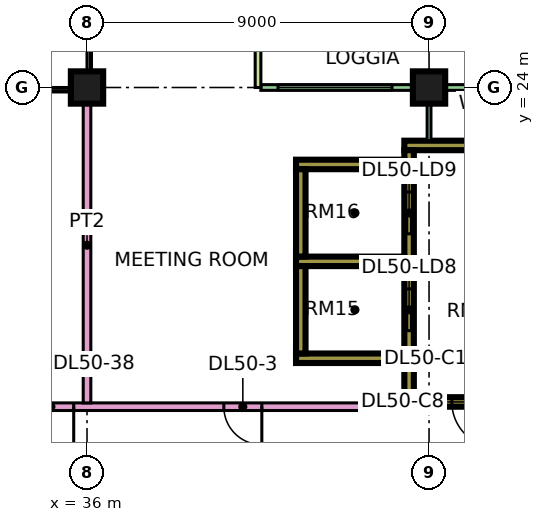
"""IFC4 building model, lengths in metres.
Left out: names, types, materials, properties, quantities, classifications, styles, units other than length and angle.
Written with IfcOpenShell. Run it as: python <this file> out.ifc"""

import sys

from ifc_helpers import new_model, si_unit, direction, frame, frame_2d, origin, origin_2d, place, context, subcontext, project, spatial, rectangle, extrude, element, fill, save


model = new_model("IFC4")
c1 = context("Model", 3, precision=1e-05, world=origin(), true_north=direction((0.0, 1.0)))
c2 = subcontext(c1, "Body", "Model", "MODEL_VIEW")
j1 = project(units=[si_unit("LENGTHUNIT", "METRE"), si_unit("PLANEANGLEUNIT", "RADIAN")], contexts=[c1])
p1 = place(None, origin())
s1 = spatial("IfcSite", under=j1, at=p1, CompositionType="ELEMENT")
p2 = place(p1, origin())
s2 = spatial("IfcBuilding", under=s1, at=p2, CompositionType="ELEMENT")
p3 = place(p2, frame((0.0, 0.0, 215.4)))
s3 = spatial("IfcBuildingStorey", under=s2, at=p3, CompositionType="ELEMENT", Elevation=215.4)
for number, where, z_axis, x_axis in (
    (1, (36.0, 24.0, 0.0), (0.0, 0.0, 1.0), (1.0, 0.0, 0.0)),
    (2, (45.0, 24.0, 0.0), (0.0, 0.0, 1.0), (1.0, 0.0, 0.0)),
):
    element("IfcColumn", number, at=place(p3, frame(where, z_axis=z_axis, x_axis=x_axis)), inside=s3, PredefinedType="COLUMN", context=c2, shape_type="SweptSolid", body=[
        extrude(rectangle(XDim=0.85, YDim=0.85, at=origin_2d()), origin(), (0.0, 0.0, 1.0), 3.75),
    ])
p4 = place(p3, frame((44.35, 15.725, 0.0), z_axis=(0.0, 0.0, 1.0), x_axis=(1.0, 0.0, 0.0)))
e3 = element("IfcWall", 3, at=p4, inside=s3, PredefinedType="SHEAR", context=c2, shape_type="SweptSolid", body=[
    extrude(rectangle(XDim=3.425, YDim=0.25, at=frame_2d((1.712, 0.0))), origin(), (0.0, 0.0, 1.0), 3.75),
])
p5 = place(p4, frame((1.25, 0.0, 0.0)))
e4 = element("IfcOpeningElement", 4, at=p5, cuts=e3, PredefinedType="OPENING", context=c2, shape_type="SweptSolid", body=[
    extrude(rectangle(XDim=1.2, YDim=2.2, at=frame_2d((0.6, 1.1))), frame((0.0, 0.135, 0.0), z_axis=(0.0, -1.0, 0.0), x_axis=(1.0, 0.0, 0.0)), (0.0, 0.0, 1.0), 0.27),
])
p6 = place(p3, frame((44.35, 22.475, 0.0), z_axis=(0.0, 0.0, 1.0), x_axis=(1.0, 0.0, 0.0)))
e5 = element("IfcWall", 5, at=p6, inside=s3, PredefinedType="SHEAR", context=c2, shape_type="SweptSolid", body=[
    extrude(rectangle(XDim=3.425, YDim=0.25, at=frame_2d((1.712, 0.0))), origin(), (0.0, 0.0, 1.0), 3.75),
])
p7 = place(p3, frame((44.475, 15.85, 0.0), z_axis=(0.0, 0.0, 1.0), x_axis=(0.0, 1.0, 0.0)))
e6 = element("IfcWall", 6, at=p7, inside=s3, PredefinedType="SHEAR", context=c2, shape_type="SweptSolid", body=[
    extrude(rectangle(XDim=6.5, YDim=0.25, at=frame_2d((3.25, 0.0))), origin(), (0.0, 0.0, 1.0), 3.75),
])
p8 = place(p7, frame((1.75, 0.0, 0.0)))
e7 = element("IfcOpeningElement", 7, at=p8, cuts=e6, PredefinedType="OPENING", context=c2, shape_type="SweptSolid", body=[
    extrude(rectangle(XDim=1.1, YDim=2.2, at=frame_2d((0.55, 1.1))), frame((0.0, 0.135, 0.0), z_axis=(0.0, -1.0, 0.0), x_axis=(1.0, 0.0, 0.0)), (0.0, 0.0, 1.0), 0.27),
])
p9 = place(p7, frame((4.3, 0.0, 0.0)))
e8 = element("IfcOpeningElement", 8, at=p9, cuts=e6, PredefinedType="OPENING", context=c2, shape_type="SweptSolid", body=[
    extrude(rectangle(XDim=1.1, YDim=2.2, at=frame_2d((0.55, 1.1))), frame((0.0, 0.135, 0.0), z_axis=(0.0, -1.0, 0.0), x_axis=(1.0, 0.0, 0.0)), (0.0, 0.0, 1.0), 0.27),
])
for number, where, z_axis, x_axis in (
    (9, (41.5, 16.875, 0.0), (0.0, 0.0, 1.0), (1.0, 0.0, 0.0)),
    (10, (41.5, 19.425, 0.0), (0.0, 0.0, 1.0), (1.0, 0.0, 0.0)),
    (11, (41.5, 21.975, 0.0), (0.0, 0.0, 1.0), (1.0, 0.0, 0.0)),
):
    element("IfcWall", number, at=place(p3, frame(where, z_axis=z_axis, x_axis=x_axis)), inside=s3, PredefinedType="SHEAR", context=c2, shape_type="SweptSolid", body=[
        extrude(rectangle(XDim=2.85, YDim=0.25, at=frame_2d((1.425, 0.0))), origin(), (0.0, 0.0, 1.0), 3.75),
    ])
for number, where, z_axis, x_axis in (
    (12, (41.625, 17.0, 0.0), (0.0, 0.0, 1.0), (0.0, 1.0, 0.0)),
    (13, (41.625, 19.55, 0.0), (0.0, 0.0, 1.0), (0.0, 1.0, 0.0)),
):
    element("IfcWall", number, at=place(p3, frame(where, z_axis=z_axis, x_axis=x_axis)), inside=s3, PredefinedType="SHEAR", context=c2, shape_type="SweptSolid", body=[
        extrude(rectangle(XDim=2.3, YDim=0.25, at=frame_2d((1.15, 0.0))), origin(), (0.0, 0.0, 1.0), 3.75),
    ])
p10 = place(p3, frame((47.925, 24.0, 0.0), z_axis=(0.0, 0.0, 1.0), x_axis=(-1.0, 0.0, 0.0)))
e14 = element("IfcWall", 14, at=p10, inside=s3, PredefinedType="SOLIDWALL", context=c2, shape_type="SweptSolid", body=[
    extrude(rectangle(XDim=7.35, YDim=0.15, at=frame_2d((3.675, 0.0))), origin(), (0.0, 0.0, 1.0), 3.35),
])
p11 = place(p10, frame((0.6, 0.0, 0.45)))
e15 = element("IfcOpeningElement", 15, at=p11, cuts=e14, PredefinedType="OPENING", context=c2, shape_type="SweptSolid", body=[
    extrude(rectangle(XDim=1.2, YDim=2.4, at=frame_2d((0.6, 1.2))), frame((0.0, 0.085, 0.0), z_axis=(0.0, -1.0, 0.0), x_axis=(1.0, 0.0, 0.0)), (0.0, 0.0, 1.0), 0.17),
])
p12 = place(p10, frame((3.9, 0.0, 0.45)))
e16 = element("IfcOpeningElement", 16, at=p12, cuts=e14, PredefinedType="OPENING", context=c2, shape_type="SweptSolid", body=[
    extrude(rectangle(XDim=3.0, YDim=2.4, at=frame_2d((1.5, 1.2))), frame((0.0, 0.085, 0.0), z_axis=(0.0, -1.0, 0.0), x_axis=(1.0, 0.0, 0.0)), (0.0, 0.0, 1.0), 0.17),
])
p13 = place(p3, frame((40.5, 25.5, 0.0), z_axis=(0.0, 0.0, 1.0), x_axis=(0.0, -1.0, 0.0)))
e17 = element("IfcWall", 17, at=p13, inside=s3, PredefinedType="SOLIDWALL", context=c2, shape_type="SweptSolid", body=[
    extrude(rectangle(XDim=1.5, YDim=0.15, at=frame_2d((0.75, 0.0))), origin(), (0.0, 0.0, 1.0), 3.35),
])
p14 = place(p3, frame((34.0, 15.6, 0.0), z_axis=(0.0, 0.0, 1.0), x_axis=(1.0, 0.0, 0.0)))
e18 = element("IfcWall", 18, at=p14, inside=s3, PredefinedType="PARTITIONING", context=c2, shape_type="SweptSolid", body=[
    extrude(rectangle(XDim=10.35, YDim=0.2, at=frame_2d((5.175, 0.0))), origin(), (0.0, 0.0, 1.0), 3.35),
])
p15 = place(p14, frame((5.6, 0.0, 0.0)))
e19 = element("IfcOpeningElement", 19, at=p15, cuts=e18, PredefinedType="OPENING", context=c2, shape_type="SweptSolid", body=[
    extrude(rectangle(XDim=1.0, YDim=2.1, at=frame_2d((0.5, 1.05))), frame((0.0, 0.11, 0.0), z_axis=(0.0, -1.0, 0.0), x_axis=(1.0, 0.0, 0.0)), (0.0, 0.0, 1.0), 0.22),
])
p16 = place(p14, frame((0.45, 0.0, 0.0)))
e20 = element("IfcOpeningElement", 20, at=p16, cuts=e18, PredefinedType="OPENING", context=c2, shape_type="SweptSolid", body=[
    extrude(rectangle(XDim=1.2, YDim=2.1, at=frame_2d((0.6, 1.05))), frame((0.0, 0.11, 0.0), z_axis=(0.0, -1.0, 0.0), x_axis=(1.0, 0.0, 0.0)), (0.0, 0.0, 1.0), 0.22),
])
p17 = place(p3, frame((36.0, 15.7, 0.0), z_axis=(0.0, 0.0, 1.0), x_axis=(0.0, 1.0, 0.0)))
e21 = element("IfcWall", 21, at=p17, inside=s3, PredefinedType="PARTITIONING", context=c2, shape_type="SweptSolid", body=[
    extrude(rectangle(XDim=8.3, YDim=0.2, at=frame_2d((4.15, 0.0))), origin(), (0.0, 0.0, 1.0), 3.35),
])
p18 = place(p3, frame((45.0, 22.6, 0.0), z_axis=(0.0, 0.0, 1.0), x_axis=(0.0, 1.0, 0.0)))
e22 = element("IfcWall", 22, at=p18, inside=s3, PredefinedType="PARTITIONING", context=c2, shape_type="SweptSolid", body=[
    extrude(rectangle(XDim=1.326, YDim=0.1, at=frame_2d((0.663, 0.0))), origin(), (0.0, 0.0, 1.0), 3.35),
])
p19 = place(p12, origin())
e23 = element("IfcWindow", 23, at=p19, inside=s3, PartitioningType="SINGLE_PANEL", PredefinedType="WINDOW", context=c2, shape_type="SweptSolid", body=[
    extrude(rectangle(XDim=3.0, YDim=2.4, at=frame_2d((1.5, 1.2))), frame((0.0, 0.03, 0.0), z_axis=(0.0, -1.0, 0.0), x_axis=(1.0, 0.0, 0.0)), (0.0, 0.0, 1.0), 0.06),
])
fill(e16, e23)
p20 = place(p5, origin())
e24 = element("IfcDoor", 24, at=p20, inside=s3, OperationType="SINGLE_SWING_RIGHT", PredefinedType="DOOR", context=c2, shape_type="SweptSolid", body=[
    extrude(rectangle(XDim=1.2, YDim=2.2, at=frame_2d((0.6, 1.1))), frame((0.0, 0.025, 0.0), z_axis=(0.0, -1.0, 0.0), x_axis=(1.0, 0.0, 0.0)), (0.0, 0.0, 1.0), 0.05),
])
fill(e4, e24)
p21 = place(p8, origin())
e25 = element("IfcDoor", 25, at=p21, inside=s3, OperationType="DOUBLE_DOOR_SLIDING", PredefinedType="DOOR", context=c2, shape_type="SweptSolid", body=[
    extrude(rectangle(XDim=1.1, YDim=2.2, at=frame_2d((0.55, 1.1))), frame((0.0, 0.025, 0.0), z_axis=(0.0, -1.0, 0.0), x_axis=(1.0, 0.0, 0.0)), (0.0, 0.0, 1.0), 0.05),
])
fill(e7, e25)
p22 = place(p9, origin())
e26 = element("IfcDoor", 26, at=p22, inside=s3, OperationType="DOUBLE_DOOR_SLIDING", PredefinedType="DOOR", context=c2, shape_type="SweptSolid", body=[
    extrude(rectangle(XDim=1.1, YDim=2.2, at=frame_2d((0.55, 1.1))), frame((0.0, 0.025, 0.0), z_axis=(0.0, -1.0, 0.0), x_axis=(1.0, 0.0, 0.0)), (0.0, 0.0, 1.0), 0.05),
])
fill(e8, e26)
p23 = place(p15, origin())
e27 = element("IfcDoor", 27, at=p23, inside=s3, OperationType="SINGLE_SWING_RIGHT", PredefinedType="DOOR", context=c2, shape_type="SweptSolid", body=[
    extrude(rectangle(XDim=1.0, YDim=2.1, at=frame_2d((0.5, 1.05))), frame((0.0, 0.025, 0.0), z_axis=(0.0, -1.0, 0.0), x_axis=(1.0, 0.0, 0.0)), (0.0, 0.0, 1.0), 0.05),
])
fill(e19, e27)
p24 = place(p16, origin())
e28 = element("IfcDoor", 28, at=p24, inside=s3, OperationType="SINGLE_SWING_RIGHT", PredefinedType="DOOR", context=c2, shape_type="SweptSolid", body=[
    extrude(rectangle(XDim=1.2, YDim=2.1, at=frame_2d((0.6, 1.05))), frame((0.0, 0.025, 0.0), z_axis=(0.0, -1.0, 0.0), x_axis=(1.0, 0.0, 0.0)), (0.0, 0.0, 1.0), 0.05),
])
fill(e20, e28)
save(model, sys.argv[1])
